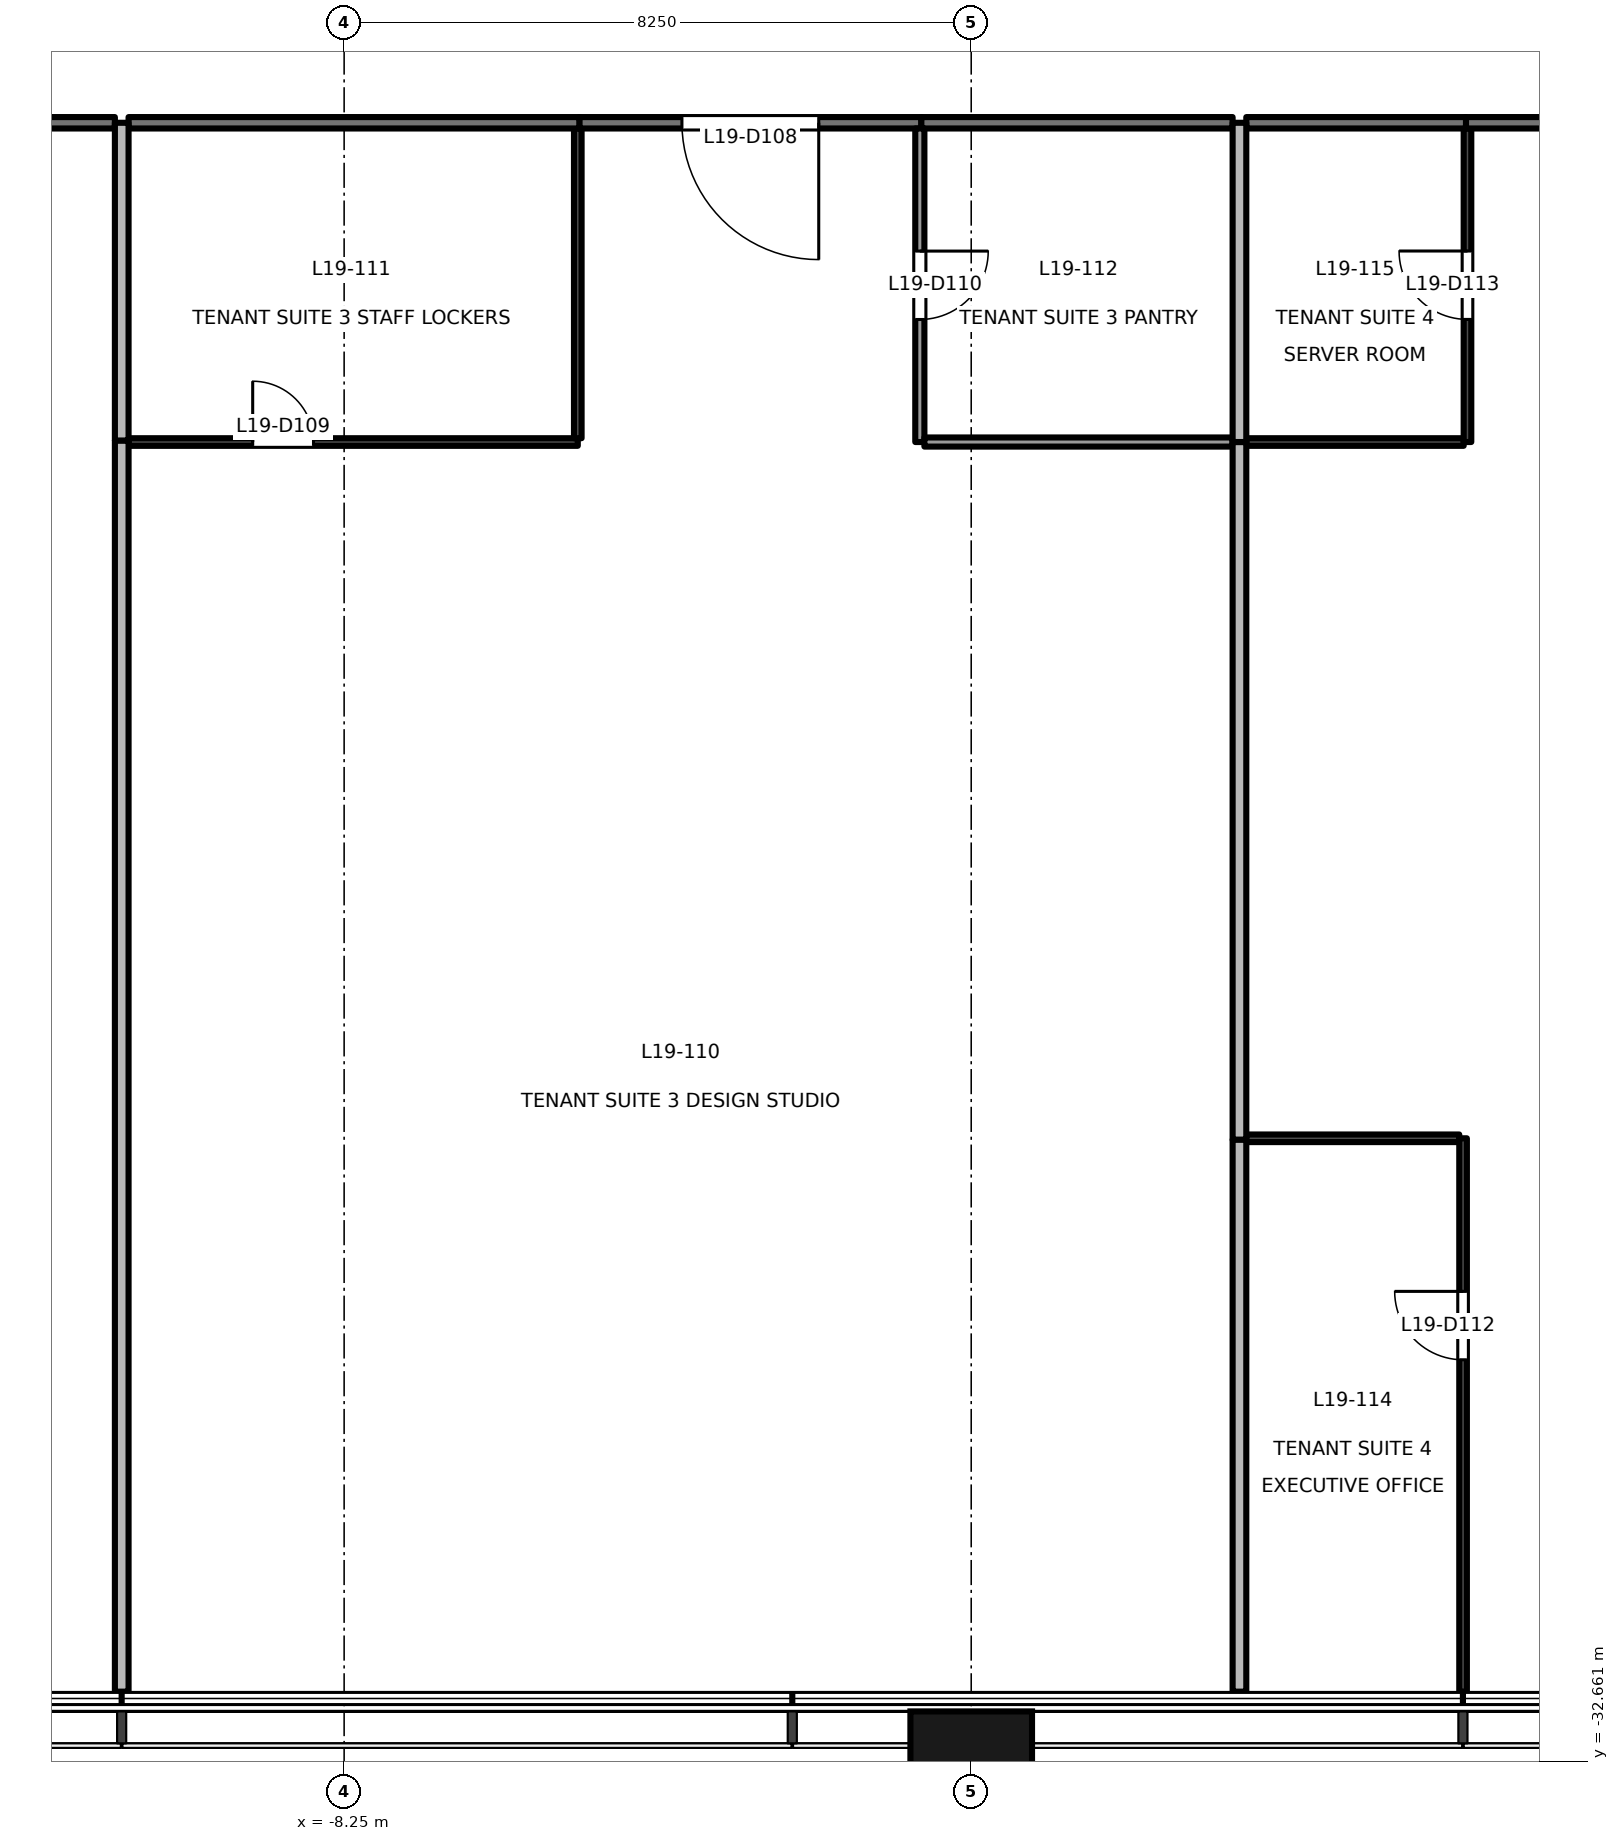
"""IFC4 building model, lengths in metres.
Left out: names, types, materials, properties, quantities, classifications, styles, units other than length and angle.
Written with IfcOpenShell. Run it as: python <this file> out.ifc"""

import sys

from ifc_helpers import new_model, si_unit, direction, frame, frame_2d, origin, origin_2d, place, context, subcontext, project, spatial, rectangle, extrude, element, fill, save


model = new_model("IFC4")
c1 = context("Model", 3, precision=1e-05, world=origin(), true_north=direction((0.0, 1.0)))
c2 = subcontext(c1, "Body", "Model", "MODEL_VIEW")
j1 = project(units=[si_unit("LENGTHUNIT", "METRE"), si_unit("PLANEANGLEUNIT", "RADIAN")], contexts=[c1])
p1 = place(None, origin())
s1 = spatial("IfcSite", under=j1, at=p1, CompositionType="ELEMENT")
p2 = place(p1, origin())
s2 = spatial("IfcBuilding", under=s1, at=p2, CompositionType="ELEMENT")
p3 = place(p2, frame((0.0, 0.0, 87.7)))
s3 = spatial("IfcBuildingStorey", under=s2, at=p3, CompositionType="ELEMENT", Elevation=87.7)
p4 = place(p3, frame((0.0, -32.9, -0.2), z_axis=(0.0, 0.0, 1.0), x_axis=(1.0, 0.0, 0.0)))
e1 = element("IfcColumn", 1, at=p4, inside=s3, PredefinedType="COLUMN", context=c2, shape_type="SweptSolid", body=[
    extrude(rectangle(XDim=1.6, YDim=1.8, at=origin_2d()), origin(), (0.0, 0.0, 1.0), 4.0),
])
p5 = place(p3, frame((-11.266, -11.1, 0.0), z_axis=(0.0, 0.0, 1.0), x_axis=(-1.0, 0.0, 0.0)))
e2 = element("IfcWall", 2, at=p5, inside=s3, PredefinedType="PARTITIONING", context=c2, shape_type="SweptSolid", body=[
    extrude(rectangle(XDim=6.754, YDim=0.15, at=frame_2d((3.377, 0.0))), origin(), (0.0, 0.0, 1.0), 2.8),
])
p6 = place(p5, frame((1.438, 0.0, 0.0)))
e3 = element("IfcOpeningElement", 3, at=p6, cuts=e2, PredefinedType="OPENING", context=c2, shape_type="SweptSolid", body=[
    extrude(rectangle(XDim=1.5, YDim=2.1, at=frame_2d((0.75, 1.05))), frame((0.0, 0.085, 0.0), z_axis=(0.0, -1.0, 0.0), x_axis=(1.0, 0.0, 0.0)), (0.0, 0.0, 1.0), 0.171),
])
p7 = place(p3, frame((-0.656, -11.1, 0.0), z_axis=(0.0, 0.0, 1.0), x_axis=(-1.0, 0.0, 0.0)))
e4 = element("IfcWall", 4, at=p7, inside=s3, PredefinedType="PARTITIONING", context=c2, shape_type="SweptSolid", body=[
    extrude(rectangle(XDim=4.5, YDim=0.15, at=frame_2d((2.25, 0.0))), origin(), (0.0, 0.0, 1.0), 2.8),
])
p8 = place(p7, frame((1.35, 0.0, 0.0)))
e5 = element("IfcOpeningElement", 5, at=p8, cuts=e4, PredefinedType="OPENING", context=c2, shape_type="SweptSolid", body=[
    extrude(rectangle(XDim=1.8, YDim=2.1, at=frame_2d((0.9, 1.05))), frame((0.0, 0.085, 0.0), z_axis=(0.0, -1.0, 0.0), x_axis=(1.0, 0.0, 0.0)), (0.0, 0.0, 1.0), 0.171),
])
p9 = place(p3, frame((-5.156, -11.1, 0.0), z_axis=(0.0, 0.0, 1.0), x_axis=(-1.0, 0.0, 0.0)))
e6 = element("IfcWall", 6, at=p9, inside=s3, PredefinedType="PARTITIONING", context=c2, shape_type="SweptSolid", body=[
    extrude(rectangle(XDim=5.93, YDim=0.15, at=frame_2d((2.965, 0.0))), origin(), (0.0, 0.0, 1.0), 2.8),
])
p10 = place(p3, frame((3.439, -11.1, 0.0), z_axis=(0.0, 0.0, 1.0), x_axis=(-1.0, 0.0, 0.0)))
e7 = element("IfcWall", 7, at=p10, inside=s3, PredefinedType="PARTITIONING", context=c2, shape_type="SweptSolid", body=[
    extrude(rectangle(XDim=4.095, YDim=0.15, at=frame_2d((2.047, 0.0))), origin(), (0.0, 0.0, 1.0), 2.8),
])
p11 = place(p3, frame((12.549, -11.1, 0.0), z_axis=(0.0, 0.0, 1.0), x_axis=(-1.0, 0.0, 0.0)))
e8 = element("IfcWall", 8, at=p11, inside=s3, PredefinedType="PARTITIONING", context=c2, shape_type="SweptSolid", body=[
    extrude(rectangle(XDim=6.04, YDim=0.15, at=frame_2d((3.02, 0.0))), origin(), (0.0, 0.0, 1.0), 2.8),
])
p12 = place(p11, frame((2.12, 0.0, 0.0)))
e9 = element("IfcOpeningElement", 9, at=p12, cuts=e8, PredefinedType="OPENING", context=c2, shape_type="SweptSolid", body=[
    extrude(rectangle(XDim=1.8, YDim=2.1, at=frame_2d((0.9, 1.05))), frame((0.0, 0.085, 0.0), z_axis=(0.0, -1.0, 0.0), x_axis=(1.0, 0.0, 0.0)), (0.0, 0.0, 1.0), 0.171),
])
p13 = place(p3, frame((6.509, -11.1, 0.0), z_axis=(0.0, 0.0, 1.0), x_axis=(-1.0, 0.0, 0.0)))
e10 = element("IfcWall", 10, at=p13, inside=s3, PredefinedType="PARTITIONING", context=c2, shape_type="SweptSolid", body=[
    extrude(rectangle(XDim=2.89, YDim=0.15, at=frame_2d((1.445, 0.0))), origin(), (0.0, 0.0, 1.0), 2.8),
])
p14 = place(p3, frame((-11.176, -15.28, 0.0), z_axis=(0.0, 0.0, 1.0), x_axis=(0.0, -1.0, 0.0)))
e11 = element("IfcWall", 11, at=p14, inside=s3, PredefinedType="PARTITIONING", context=c2, shape_type="SweptSolid", body=[
    extrude(rectangle(XDim=16.46, YDim=0.18, at=frame_2d((8.23, 0.0))), origin(), (0.0, 0.0, 1.0), 3.8),
])
p15 = place(p3, frame((-11.176, -11.1, 0.0), z_axis=(0.0, 0.0, 1.0), x_axis=(0.0, -1.0, 0.0)))
e12 = element("IfcWall", 12, at=p15, inside=s3, PredefinedType="PARTITIONING", context=c2, shape_type="SweptSolid", body=[
    extrude(rectangle(XDim=4.18, YDim=0.18, at=frame_2d((2.09, 0.0))), origin(), (0.0, 0.0, 1.0), 3.8),
])
p16 = place(p3, frame((-11.086, -15.3, 0.0), z_axis=(0.0, 0.0, 1.0), x_axis=(1.0, 0.0, 0.0)))
e13 = element("IfcWall", 13, at=p16, inside=s3, PredefinedType="PARTITIONING", context=c2, shape_type="SweptSolid", body=[
    extrude(rectangle(XDim=5.91, YDim=0.1, at=frame_2d((2.955, 0.0))), origin(), (0.0, 0.0, 1.0), 2.8),
])
p17 = place(p16, frame((1.633, 0.0, 0.0)))
e14 = element("IfcOpeningElement", 14, at=p17, cuts=e13, PredefinedType="OPENING", context=c2, shape_type="SweptSolid", body=[
    extrude(rectangle(XDim=0.8, YDim=2.1, at=frame_2d((0.4, 1.05))), frame((0.0, 0.061, 0.0), z_axis=(0.0, -1.0, 0.0), x_axis=(1.0, 0.0, 0.0)), (0.0, 0.0, 1.0), 0.121),
])
p18 = place(p3, frame((-5.176, -15.25, 0.0), z_axis=(0.0, 0.0, 1.0), x_axis=(0.0, 1.0, 0.0)))
e15 = element("IfcWall", 15, at=p18, inside=s3, PredefinedType="PARTITIONING", context=c2, shape_type="SweptSolid", body=[
    extrude(rectangle(XDim=4.075, YDim=0.1, at=frame_2d((2.038, 0.0))), origin(), (0.0, 0.0, 1.0), 3.8),
])
p19 = place(p3, frame((-0.676, -11.175, 0.0), z_axis=(0.0, 0.0, 1.0), x_axis=(0.0, -1.0, 0.0)))
e16 = element("IfcWall", 16, at=p19, inside=s3, PredefinedType="PARTITIONING", context=c2, shape_type="SweptSolid", body=[
    extrude(rectangle(XDim=4.125, YDim=0.12, at=frame_2d((2.062, 0.0))), origin(), (0.0, 0.0, 1.0), 3.8),
])
p20 = place(p19, frame((1.613, 0.0, 0.0)))
e17 = element("IfcOpeningElement", 17, at=p20, cuts=e16, PredefinedType="OPENING", context=c2, shape_type="SweptSolid", body=[
    extrude(rectangle(XDim=0.9, YDim=2.1, at=frame_2d((0.45, 1.05))), frame((0.0, 0.071, 0.0), z_axis=(0.0, -1.0, 0.0), x_axis=(1.0, 0.0, 0.0)), (0.0, 0.0, 1.0), 0.141),
])
p21 = place(p3, frame((-0.616, -15.3, 0.0), z_axis=(0.0, 0.0, 1.0), x_axis=(1.0, 0.0, 0.0)))
e18 = element("IfcWall", 18, at=p21, inside=s3, PredefinedType="PARTITIONING", context=c2, shape_type="SweptSolid", body=[
    extrude(rectangle(XDim=4.055, YDim=0.12, at=frame_2d((2.027, 0.0))), origin(), (0.0, 0.0, 1.0), 2.8),
])
p22 = place(p3, frame((3.529, -15.3, 0.0), z_axis=(0.0, 0.0, 1.0), x_axis=(0.0, -1.0, 0.0)))
e19 = element("IfcWall", 19, at=p22, inside=s3, PredefinedType="PARTITIONING", context=c2, shape_type="SweptSolid", body=[
    extrude(rectangle(XDim=9.18, YDim=0.18, at=frame_2d((4.59, 0.0))), origin(), (0.0, 0.0, 1.0), 3.8),
])
p23 = place(p3, frame((3.529, -24.48, 0.0), z_axis=(0.0, 0.0, 1.0), x_axis=(0.0, -1.0, 0.0)))
e20 = element("IfcWall", 20, at=p23, inside=s3, PredefinedType="PARTITIONING", context=c2, shape_type="SweptSolid", body=[
    extrude(rectangle(XDim=7.26, YDim=0.18, at=frame_2d((3.63, 0.0))), origin(), (0.0, 0.0, 1.0), 3.8),
])
p24 = place(p3, frame((3.529, -11.1, 0.0), z_axis=(0.0, 0.0, 1.0), x_axis=(0.0, -1.0, 0.0)))
e21 = element("IfcWall", 21, at=p24, inside=s3, PredefinedType="PARTITIONING", context=c2, shape_type="SweptSolid", body=[
    extrude(rectangle(XDim=4.2, YDim=0.18, at=frame_2d((2.1, 0.0))), origin(), (0.0, 0.0, 1.0), 3.8),
])
p25 = place(p3, frame((6.421, -24.46, 0.0), z_axis=(0.0, 0.0, 1.0), x_axis=(-1.0, 0.0, 0.0)))
e22 = element("IfcWall", 22, at=p25, inside=s3, PredefinedType="PARTITIONING", context=c2, shape_type="SweptSolid", body=[
    extrude(rectangle(XDim=2.802, YDim=0.1, at=frame_2d((1.401, 0.0))), origin(), (0.0, 0.0, 1.0), 2.8),
])
p26 = place(p3, frame((6.471, -31.74, 0.0), z_axis=(0.0, 0.0, 1.0), x_axis=(0.0, 1.0, 0.0)))
e23 = element("IfcWall", 23, at=p26, inside=s3, PredefinedType="PARTITIONING", context=c2, shape_type="SweptSolid", body=[
    extrude(rectangle(XDim=7.28, YDim=0.1, at=frame_2d((3.64, 0.0))), origin(), (0.0, 0.0, 1.0), 3.8),
])
p27 = place(p26, frame((4.366, 0.0, 0.0)))
e24 = element("IfcOpeningElement", 24, at=p27, cuts=e23, PredefinedType="OPENING", context=c2, shape_type="SweptSolid", body=[
    extrude(rectangle(XDim=0.9, YDim=2.1, at=frame_2d((0.45, 1.05))), frame((0.0, 0.061, 0.0), z_axis=(0.0, -1.0, 0.0), x_axis=(1.0, 0.0, 0.0)), (0.0, 0.0, 1.0), 0.121),
])
p28 = place(p3, frame((3.619, -15.3, 0.0), z_axis=(0.0, 0.0, 1.0), x_axis=(1.0, 0.0, 0.0)))
e25 = element("IfcWall", 25, at=p28, inside=s3, PredefinedType="PARTITIONING", context=c2, shape_type="SweptSolid", body=[
    extrude(rectangle(XDim=2.86, YDim=0.1, at=frame_2d((1.43, 0.0))), origin(), (0.0, 0.0, 1.0), 2.8),
])
p29 = place(p3, frame((6.529, -15.3, 0.0), z_axis=(0.0, 0.0, 1.0), x_axis=(0.0, 1.0, 0.0)))
e26 = element("IfcWall", 26, at=p29, inside=s3, PredefinedType="PARTITIONING", context=c2, shape_type="SweptSolid", body=[
    extrude(rectangle(XDim=4.125, YDim=0.1, at=frame_2d((2.062, 0.0))), origin(), (0.0, 0.0, 1.0), 3.8),
])
p30 = place(p29, frame((1.613, 0.0, 0.0)))
e27 = element("IfcOpeningElement", 27, at=p30, cuts=e26, PredefinedType="OPENING", context=c2, shape_type="SweptSolid", body=[
    extrude(rectangle(XDim=0.9, YDim=2.1, at=frame_2d((0.45, 1.05))), frame((0.0, 0.061, 0.0), z_axis=(0.0, -1.0, 0.0), x_axis=(1.0, 0.0, 0.0)), (0.0, 0.0, 1.0), 0.121),
])
p31 = place(p8, origin())
e28 = element("IfcDoor", 28, at=p31, inside=s3, OperationType="DOUBLE_DOOR_SINGLE_SWING", PredefinedType="DOOR", context=c2, shape_type="SweptSolid", body=[
    extrude(rectangle(XDim=1.8, YDim=2.1, at=frame_2d((0.9, 1.05))), frame((0.0, 0.025, 0.0), z_axis=(0.0, -1.0, 0.0), x_axis=(1.0, 0.0, 0.0)), (0.0, 0.0, 1.0), 0.05),
])
fill(e5, e28)
p32 = place(p17, origin())
e29 = element("IfcDoor", 29, at=p32, inside=s3, OperationType="SINGLE_SWING_LEFT", PredefinedType="DOOR", context=c2, shape_type="SweptSolid", body=[
    extrude(rectangle(XDim=0.8, YDim=2.1, at=frame_2d((0.4, 1.05))), frame((0.0, 0.025, 0.0), z_axis=(0.0, -1.0, 0.0), x_axis=(1.0, 0.0, 0.0)), (0.0, 0.0, 1.0), 0.05),
])
fill(e14, e29)
p33 = place(p20, origin())
e30 = element("IfcDoor", 30, at=p33, inside=s3, OperationType="SINGLE_SWING_LEFT", PredefinedType="DOOR", context=c2, shape_type="SweptSolid", body=[
    extrude(rectangle(XDim=0.9, YDim=2.1, at=frame_2d((0.45, 1.05))), frame((0.0, 0.025, 0.0), z_axis=(0.0, -1.0, 0.0), x_axis=(1.0, 0.0, 0.0)), (0.0, 0.0, 1.0), 0.05),
])
fill(e17, e30)
p34 = place(p27, origin())
e31 = element("IfcDoor", 31, at=p34, inside=s3, OperationType="SINGLE_SWING_RIGHT", PredefinedType="DOOR", context=c2, shape_type="SweptSolid", body=[
    extrude(rectangle(XDim=0.9, YDim=2.1, at=frame_2d((0.45, 1.05))), frame((0.0, 0.025, 0.0), z_axis=(0.0, -1.0, 0.0), x_axis=(1.0, 0.0, 0.0)), (0.0, 0.0, 1.0), 0.05),
])
fill(e24, e31)
p35 = place(p30, origin())
e32 = element("IfcDoor", 32, at=p35, inside=s3, OperationType="SINGLE_SWING_RIGHT", PredefinedType="DOOR", context=c2, shape_type="SweptSolid", body=[
    extrude(rectangle(XDim=0.9, YDim=2.1, at=frame_2d((0.45, 1.05))), frame((0.0, 0.025, 0.0), z_axis=(0.0, -1.0, 0.0), x_axis=(1.0, 0.0, 0.0)), (0.0, 0.0, 1.0), 0.05),
])
fill(e27, e32)
save(model, sys.argv[1])
